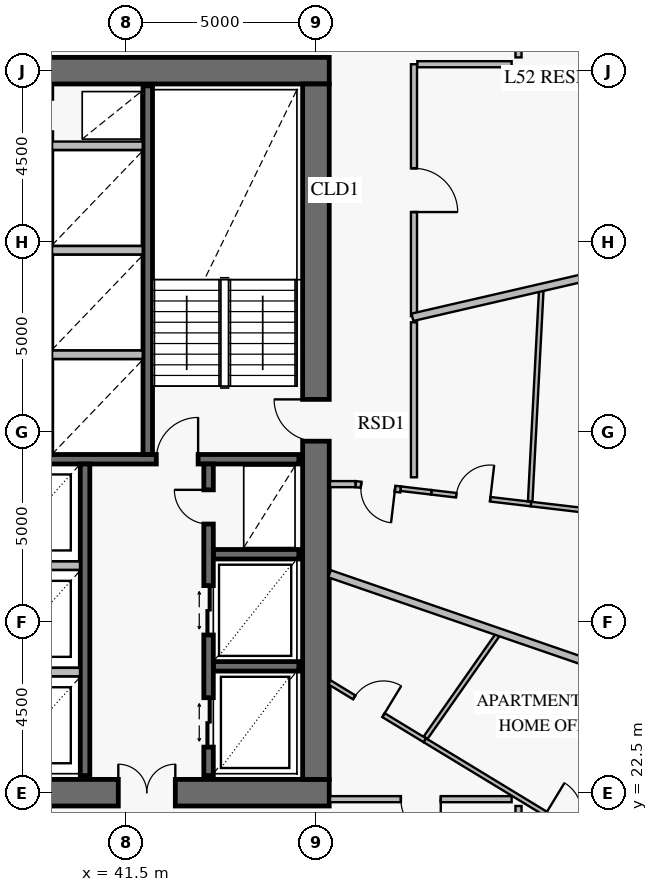
"""IFC4 building model, lengths in metres.
Left out: names, types, materials, properties, quantities, classifications, styles, units other than length and angle.
Written with IfcOpenShell. Run it as: python <this file> out.ifc"""

import sys

from ifc_helpers import new_model, si_unit, direction, frame, frame_2d, origin, place, context, subcontext, project, spatial, rectangle, extrude, element, fill, save


model = new_model("IFC4")
c1 = context("Model", 3, precision=1e-05, world=origin(), true_north=direction((0.0, 1.0)))
c2 = subcontext(c1, "Body", "Model", "MODEL_VIEW")
j1 = project(units=[si_unit("LENGTHUNIT", "METRE"), si_unit("PLANEANGLEUNIT", "RADIAN")], contexts=[c1])
p1 = place(None, origin())
s1 = spatial("IfcSite", under=j1, at=p1, CompositionType="ELEMENT")
p2 = place(p1, origin())
s2 = spatial("IfcBuilding", under=s1, at=p2, CompositionType="ELEMENT")
p3 = place(p2, frame((0.0, 0.0, 207.4)))
s3 = spatial("IfcBuildingStorey", under=s2, at=p3, CompositionType="ELEMENT", Elevation=207.4)
p4 = place(p3, frame((37.35, 22.5, 0.0), z_axis=(0.0, 0.0, 1.0), x_axis=(1.0, 0.0, 0.0)))
e1 = element("IfcWall", 1, at=p4, inside=s3, PredefinedType="SHEAR", context=c2, shape_type="SweptSolid", body=[
    extrude(rectangle(XDim=9.5, YDim=0.7, at=frame_2d((4.75, 0.0))), origin(), (0.0, 0.0, 1.0), 3.8),
])
p5 = place(p4, frame((3.95, 0.0, 0.0)))
e2 = element("IfcOpeningElement", 2, at=p5, cuts=e1, PredefinedType="OPENING", context=c2, shape_type="SweptSolid", body=[
    extrude(rectangle(XDim=1.5, YDim=2.15, at=frame_2d((0.75, 1.075))), frame((0.0, 0.362, 0.0), z_axis=(0.0, -1.0, 0.0), x_axis=(1.0, 0.0, 0.0)), (0.0, 0.0, 1.0), 0.724),
])
p6 = place(p3, frame((46.85, 41.5, 0.0), z_axis=(0.0, 0.0, 1.0), x_axis=(-1.0, 0.0, 0.0)))
e3 = element("IfcWall", 3, at=p6, inside=s3, PredefinedType="SHEAR", context=c2, shape_type="SweptSolid", body=[
    extrude(rectangle(XDim=7.9, YDim=0.7, at=frame_2d((3.95, 0.0))), origin(), (0.0, 0.0, 1.0), 3.8),
])
p7 = place(p3, frame((46.5, 22.85, 0.0), z_axis=(0.0, 0.0, 1.0), x_axis=(0.0, 1.0, 0.0)))
e4 = element("IfcWall", 4, at=p7, inside=s3, PredefinedType="SHEAR", context=c2, shape_type="SweptSolid", body=[
    extrude(rectangle(XDim=18.3, YDim=0.7, at=frame_2d((9.15, 0.0))), origin(), (0.0, 0.0, 1.0), 3.8),
])
p8 = place(p7, frame((8.9, 0.0, 0.0)))
e5 = element("IfcOpeningElement", 5, at=p8, cuts=e4, PredefinedType="OPENING", context=c2, shape_type="SweptSolid", body=[
    extrude(rectangle(XDim=1.1, YDim=2.15, at=frame_2d((0.55, 1.075))), frame((0.0, 0.362, 0.0), z_axis=(0.0, -1.0, 0.0), x_axis=(1.0, 0.0, 0.0)), (0.0, 0.0, 1.0), 0.724),
])
p9 = place(p3, frame((25.95, 31.275, 0.0), z_axis=(0.0, 0.0, 1.0), x_axis=(1.0, 0.0, 0.0)))
e6 = element("IfcWall", 6, at=p9, inside=s3, PredefinedType="SOLIDWALL", context=c2, shape_type="SweptSolid", body=[
    extrude(rectangle(XDim=20.1, YDim=0.25, at=frame_2d((10.05, 0.0))), origin(), (0.0, 0.0, 1.0), 3.8),
])
p10 = place(p9, frame((2.6, 0.0, 0.0)))
e7 = element("IfcOpeningElement", 7, at=p10, cuts=e6, PredefinedType="OPENING", context=c2, shape_type="SweptSolid", body=[
    extrude(rectangle(XDim=1.1, YDim=2.15, at=frame_2d((0.55, 1.075))), frame((0.0, 0.137, 0.0), z_axis=(0.0, -1.0, 0.0), x_axis=(1.0, 0.0, 0.0)), (0.0, 0.0, 1.0), 0.274),
])
p11 = place(p9, frame((10.6, 0.0, 0.0)))
e8 = element("IfcOpeningElement", 8, at=p11, cuts=e6, PredefinedType="OPENING", context=c2, shape_type="SweptSolid", body=[
    extrude(rectangle(XDim=1.1, YDim=2.15, at=frame_2d((0.55, 1.075))), frame((0.0, 0.137, 0.0), z_axis=(0.0, -1.0, 0.0), x_axis=(1.0, 0.0, 0.0)), (0.0, 0.0, 1.0), 0.274),
])
p12 = place(p9, frame((16.35, 0.0, 0.0)))
e9 = element("IfcOpeningElement", 9, at=p12, cuts=e6, PredefinedType="OPENING", context=c2, shape_type="SweptSolid", body=[
    extrude(rectangle(XDim=1.1, YDim=2.15, at=frame_2d((0.55, 1.075))), frame((0.0, 0.137, 0.0), z_axis=(0.0, -1.0, 0.0), x_axis=(1.0, 0.0, 0.0)), (0.0, 0.0, 1.0), 0.274),
])
p13 = place(p3, frame((42.075, 31.4, 0.0), z_axis=(0.0, 0.0, 1.0), x_axis=(0.0, 1.0, 0.0)))
e10 = element("IfcWall", 10, at=p13, inside=s3, PredefinedType="SOLIDWALL", context=c2, shape_type="SweptSolid", body=[
    extrude(rectangle(XDim=9.7, YDim=0.25, at=frame_2d((4.85, 0.0))), origin(), (0.0, 0.0, 1.0), 3.8),
])
p14 = place(p3, frame((40.425, 22.95, 0.0), z_axis=(0.0, 0.0, 1.0), x_axis=(0.0, 1.0, 0.0)))
e11 = element("IfcWall", 11, at=p14, inside=s3, PredefinedType="SOLIDWALL", context=c2, shape_type="SweptSolid", body=[
    extrude(rectangle(XDim=8.2, YDim=0.25, at=frame_2d((4.1, 0.0))), origin(), (0.0, 0.0, 1.0), 3.8),
])
for number, where, z_axis, x_axis in (
    (12, (43.8, 25.825, 0.0), (0.0, 0.0, 1.0), (1.0, 0.0, 0.0)),
    (13, (43.8, 28.775, 0.0), (0.0, 0.0, 1.0), (1.0, 0.0, 0.0)),
):
    element("IfcWall", number, at=place(p3, frame(where, z_axis=z_axis, x_axis=x_axis)), inside=s3, PredefinedType="SOLIDWALL", context=c2, shape_type="SweptSolid", body=[
        extrude(rectangle(XDim=2.25, YDim=0.25, at=frame_2d((1.125, 0.0))), origin(), (0.0, 0.0, 1.0), 3.8),
    ])
p15 = place(p3, frame((43.675, 22.95, 0.0), z_axis=(0.0, 0.0, 1.0), x_axis=(0.0, 1.0, 0.0)))
e14 = element("IfcWall", 14, at=p15, inside=s3, PredefinedType="SOLIDWALL", context=c2, shape_type="SweptSolid", body=[
    extrude(rectangle(XDim=8.2, YDim=0.25, at=frame_2d((4.1, 0.0))), origin(), (0.0, 0.0, 1.0), 3.8),
])
p16 = place(p15, frame((0.75, 0.0, 0.0)))
e15 = element("IfcOpeningElement", 15, at=p16, cuts=e14, PredefinedType="OPENING", context=c2, shape_type="SweptSolid", body=[
    extrude(rectangle(XDim=1.3, YDim=2.3, at=frame_2d((0.65, 1.15))), frame((0.0, 0.137, 0.0), z_axis=(0.0, -1.0, 0.0), x_axis=(1.0, 0.0, 0.0)), (0.0, 0.0, 1.0), 0.274),
])
p17 = place(p15, frame((3.7, 0.0, 0.0)))
e16 = element("IfcOpeningElement", 16, at=p17, cuts=e14, PredefinedType="OPENING", context=c2, shape_type="SweptSolid", body=[
    extrude(rectangle(XDim=1.3, YDim=2.3, at=frame_2d((0.65, 1.15))), frame((0.0, 0.137, 0.0), z_axis=(0.0, -1.0, 0.0), x_axis=(1.0, 0.0, 0.0)), (0.0, 0.0, 1.0), 0.274),
])
p18 = place(p15, frame((6.62, 0.0, 0.0)))
e17 = element("IfcOpeningElement", 17, at=p18, cuts=e14, PredefinedType="OPENING", context=c2, shape_type="SweptSolid", body=[
    extrude(rectangle(XDim=0.9, YDim=2.1, at=frame_2d((0.45, 1.05))), frame((0.0, 0.137, 0.0), z_axis=(0.0, -1.0, 0.0), x_axis=(1.0, 0.0, 0.0)), (0.0, 0.0, 1.0), 0.274),
])
p19 = place(p3, frame((46.858, 25.404, 0.0), z_axis=(0.0, 0.0, 1.0), x_axis=(0.85464129029, -0.519218898857, 0.0)))
e18 = element("IfcWall", 18, at=p19, inside=s3, PredefinedType="PARTITIONING", context=c2, shape_type="SweptSolid", body=[
    extrude(rectangle(XDim=2.937, YDim=0.12, at=frame_2d((1.469, 0.0))), origin(), (0.0, 0.0, 1.0), 3.55),
])
p20 = place(p19, frame((0.761, 0.0, 0.0)))
e19 = element("IfcOpeningElement", 19, at=p20, cuts=e18, PredefinedType="OPENING", context=c2, shape_type="SweptSolid", body=[
    extrude(rectangle(XDim=0.9, YDim=2.1, at=frame_2d((0.45, 1.05))), frame((0.0, 0.072, 0.0), z_axis=(0.0, -1.0, 0.0), x_axis=(1.0, 0.0, 0.0)), (0.0, 0.0, 1.0), 0.144),
])
p21 = place(p3, frame((49.368, 23.879, 0.0), z_axis=(0.0, 0.0, 1.0), x_axis=(0.854630517303, -0.519236630925, 0.0)))
e20 = element("IfcWall", 20, at=p21, inside=s3, PredefinedType="PARTITIONING", context=c2, shape_type="SweptSolid", body=[
    extrude(rectangle(XDim=7.122, YDim=0.12, at=frame_2d((3.561, 0.0))), origin(), (0.0, 0.0, 1.0), 3.15),
])
p22 = place(p21, frame((3.721, 0.0, 0.0)))
e21 = element("IfcOpeningElement", 21, at=p22, cuts=e20, PredefinedType="OPENING", context=c2, shape_type="SweptSolid", body=[
    extrude(rectangle(XDim=0.95, YDim=2.1, at=frame_2d((0.475, 1.05))), frame((0.0, 0.072, 0.0), z_axis=(0.0, -1.0, 0.0), x_axis=(1.0, 0.0, 0.0)), (0.0, 0.0, 1.0), 0.144),
])
p23 = place(p3, frame((51.65, 22.33, 0.0), z_axis=(0.0, 0.0, 1.0), x_axis=(-1.0, 0.0, 0.0)))
e22 = element("IfcWall", 22, at=p23, inside=s3, PredefinedType="PARTITIONING", context=c2, shape_type="SweptSolid", body=[
    extrude(rectangle(XDim=4.78, YDim=0.16, at=frame_2d((2.39, 0.0))), origin(), (0.0, 0.0, 1.0), 3.55),
])
p24 = place(p23, frame((1.865, 0.0, 0.0)))
e23 = element("IfcOpeningElement", 23, at=p24, cuts=e22, PredefinedType="OPENING", context=c2, shape_type="SweptSolid", body=[
    extrude(rectangle(XDim=1.05, YDim=2.15, at=frame_2d((0.525, 1.075))), frame((0.0, 0.092, 0.0), z_axis=(0.0, -1.0, 0.0), x_axis=(1.0, 0.0, 0.0)), (0.0, 0.0, 1.0), 0.184),
])
p25 = place(p3, frame((49.537, 30.405, 0.0), z_axis=(0.0, 0.0, 1.0), x_axis=(0.993127868893, -0.117034336965, 0.0)))
e24 = element("IfcWall", 24, at=p25, inside=s3, PredefinedType="PARTITIONING", context=c2, shape_type="SweptSolid", body=[
    extrude(rectangle(XDim=2.641, YDim=0.12, at=frame_2d((1.32, 0.0))), origin(), (0.0, 0.0, 1.0), 3.55),
])
p26 = place(p25, frame((0.659, 0.0, 0.0)))
e25 = element("IfcOpeningElement", 25, at=p26, cuts=e24, PredefinedType="OPENING", context=c2, shape_type="SweptSolid", body=[
    extrude(rectangle(XDim=0.9, YDim=2.1, at=frame_2d((0.45, 1.05))), frame((0.0, 0.072, 0.0), z_axis=(0.0, -1.0, 0.0), x_axis=(1.0, 0.0, 0.0)), (0.0, 0.0, 1.0), 0.144),
])
p27 = place(p3, frame((52.159, 30.096, 0.0), z_axis=(0.0, 0.0, 1.0), x_axis=(0.993128962812, -0.117025053828, 0.0)))
e26 = element("IfcWall", 26, at=p27, inside=s3, PredefinedType="PARTITIONING", context=c2, shape_type="SweptSolid", body=[
    extrude(rectangle(XDim=10.25, YDim=0.12, at=frame_2d((5.125, 0.0))), origin(), (0.0, 0.0, 1.0), 2.87),
])
p28 = place(p27, frame((4.625, 0.0, 0.0)))
e27 = element("IfcOpeningElement", 27, at=p28, cuts=e26, PredefinedType="OPENING", context=c2, shape_type="SweptSolid", body=[
    extrude(rectangle(XDim=0.95, YDim=2.1, at=frame_2d((0.475, 1.05))), frame((0.0, 0.072, 0.0), z_axis=(0.0, -1.0, 0.0), x_axis=(1.0, 0.0, 0.0)), (0.0, 0.0, 1.0), 0.144),
])
p29 = place(p3, frame((47.541, 30.62, 0.0), z_axis=(0.0, 0.0, 1.0), x_axis=(0.993117135496, -0.117125382325, 0.0)))
e28 = element("IfcWall", 28, at=p29, inside=s3, PredefinedType="PARTITIONING", context=c2, shape_type="SweptSolid", body=[
    extrude(rectangle(XDim=1.197, YDim=0.16, at=frame_2d((0.598, 0.0))), origin(), (0.0, 0.0, 1.0), 3.55),
])
p30 = place(p29, frame((0.148, 0.0, 0.0)))
e29 = element("IfcOpeningElement", 29, at=p30, cuts=e28, PredefinedType="OPENING", context=c2, shape_type="SweptSolid", body=[
    extrude(rectangle(XDim=0.9, YDim=2.1, at=frame_2d((0.45, 1.05))), frame((0.0, 0.092, 0.0), z_axis=(0.0, -1.0, 0.0), x_axis=(1.0, 0.0, 0.0)), (0.0, 0.0, 1.0), 0.184),
])
p31 = place(p3, frame((49.08, 35.04, 0.0), z_axis=(0.0, 0.0, 1.0), x_axis=(0.0, 1.0, 0.0)))
e30 = element("IfcWall", 30, at=p31, inside=s3, PredefinedType="PARTITIONING", context=c2, shape_type="SweptSolid", body=[
    extrude(rectangle(XDim=6.63, YDim=0.16, at=frame_2d((3.315, 0.0))), origin(), (0.0, 0.0, 1.0), 2.9),
])
p32 = place(p31, frame((2.74, 0.0, 0.0)))
e31 = element("IfcOpeningElement", 31, at=p32, cuts=e30, PredefinedType="OPENING", context=c2, shape_type="SweptSolid", body=[
    extrude(rectangle(XDim=1.15, YDim=2.2, at=frame_2d((0.575, 1.1))), frame((0.0, 0.092, 0.0), z_axis=(0.0, -1.0, 0.0), x_axis=(1.0, 0.0, 0.0)), (0.0, 0.0, 1.0), 0.184),
])
for number, where, z_axis, x_axis in (
    (32, (39.558, 34.025, 0.0), (0.0, 0.0, 1.0), (1.0, 0.0, 0.0)),
    (33, (39.558, 36.775, 0.0), (0.0, 0.0, 1.0), (1.0, 0.0, 0.0)),
    (34, (39.558, 39.525, 0.0), (0.0, 0.0, 1.0), (1.0, 0.0, 0.0)),
):
    element("IfcWall", number, at=place(p3, frame(where, z_axis=z_axis, x_axis=x_axis)), inside=s3, PredefinedType="PARTITIONING", context=c2, shape_type="SweptSolid", body=[
        extrude(rectangle(XDim=2.384, YDim=0.22, at=frame_2d((1.192, 0.0))), origin(), (0.0, 0.0, 1.0), 3.55),
    ])
for number, where, z_axis, x_axis in (
    (35, (38.008, 25.675, 0.0), (0.0, 0.0, 1.0), (1.0, 0.0, 0.0)),
    (36, (38.008, 28.475, 0.0), (0.0, 0.0, 1.0), (1.0, 0.0, 0.0)),
):
    element("IfcWall", number, at=place(p3, frame(where, z_axis=z_axis, x_axis=x_axis)), inside=s3, PredefinedType="PARTITIONING", context=c2, shape_type="SweptSolid", body=[
        extrude(rectangle(XDim=2.284, YDim=0.22, at=frame_2d((1.142, 0.0))), origin(), (0.0, 0.0, 1.0), 3.55),
    ])
p33 = place(p3, frame((49.385, 23.948, 0.0), z_axis=(0.0, 0.0, 1.0), x_axis=(0.573609327382, 0.819129012757, 0.0)))
e37 = element("IfcWall", 37, at=p33, inside=s3, PredefinedType="PARTITIONING", context=c2, shape_type="SweptSolid", body=[
    extrude(rectangle(XDim=3.344, YDim=0.12, at=frame_2d((1.672, 0.0))), origin(), (0.0, 0.0, 1.0), 3.55),
])
p34 = place(p3, frame((46.858, 28.261, 0.0), z_axis=(0.0, 0.0, 1.0), x_axis=(0.945519192018, -0.325566364243, 0.0)))
e38 = element("IfcWall", 38, at=p34, inside=s3, PredefinedType="PARTITIONING", context=c2, shape_type="SweptSolid", body=[
    extrude(rectangle(XDim=16.208, YDim=0.2, at=frame_2d((8.104, 0.0))), origin(), (0.0, 0.0, 1.0), 2.87),
])
p35 = place(p3, frame((48.732, 30.5, 0.0), z_axis=(0.0, 0.0, 1.0), x_axis=(0.993146491389, -0.116876202202, 0.0)))
e39 = element("IfcWall", 39, at=p35, inside=s3, PredefinedType="PARTITIONING", context=c2, shape_type="SweptSolid", body=[
    extrude(rectangle(XDim=0.811, YDim=0.12, at=frame_2d((0.405, 0.0))), origin(), (0.0, 0.0, 1.0), 3.55),
])
p36 = place(p3, frame((52.138, 30.167, 0.0), z_axis=(0.0, 0.0, 1.0), x_axis=(0.052317957022, 0.998630477891, 0.0)))
e40 = element("IfcWall", 40, at=p36, inside=s3, PredefinedType="PARTITIONING", context=c2, shape_type="SweptSolid", body=[
    extrude(rectangle(XDim=5.586, YDim=0.12, at=frame_2d((2.793, 0.0))), origin(), (0.0, 0.0, 1.0), 3.55),
])
p37 = place(p3, frame((49.04, 35.01, 0.0), z_axis=(0.0, 0.0, 1.0), x_axis=(0.974369033518, 0.224955521206, 0.0)))
e41 = element("IfcWall", 41, at=p37, inside=s3, PredefinedType="PARTITIONING", context=c2, shape_type="SweptSolid", body=[
    extrude(rectangle(XDim=15.042, YDim=0.2, at=frame_2d((7.521, 0.0))), origin(), (0.0, 0.0, 1.0), 2.87),
])
p38 = place(p3, frame((51.83, 18.45, 0.0), z_axis=(0.0, 0.0, 1.0), x_axis=(0.0, 1.0, 0.0)))
e42 = element("IfcWall", 42, at=p38, inside=s3, PredefinedType="PARTITIONING", context=c2, shape_type="SweptSolid", body=[
    extrude(rectangle(XDim=3.7, YDim=0.16, at=frame_2d((1.85, 0.0))), origin(), (0.0, 0.0, 1.0), 3.15),
])
p39 = place(p3, frame((46.87, 30.62, 0.0), z_axis=(0.0, 0.0, 1.0), x_axis=(1.0, 0.0, 0.0)))
e43 = element("IfcWall", 43, at=p39, inside=s3, PredefinedType="PARTITIONING", context=c2, shape_type="SweptSolid", body=[
    extrude(rectangle(XDim=0.671, YDim=0.16, at=frame_2d((0.335, 0.0))), origin(), (0.0, 0.0, 1.0), 3.55),
])
p40 = place(p3, frame((49.08, 30.8, 0.0), z_axis=(0.0, 0.0, 1.0), x_axis=(0.0, 1.0, 0.0)))
e44 = element("IfcWall", 44, at=p40, inside=s3, PredefinedType="PARTITIONING", context=c2, shape_type="SweptSolid", body=[
    extrude(rectangle(XDim=4.079, YDim=0.16, at=frame_2d((2.04, 0.0))), origin(), (0.0, 0.0, 1.0), 3.55),
])
p41 = place(p3, frame((51.83, 41.85, 0.0), z_axis=(0.0, 0.0, 1.0), x_axis=(0.0, 1.0, 0.0)))
e45 = element("IfcWall", 45, at=p41, inside=s3, PredefinedType="PARTITIONING", context=c2, shape_type="SweptSolid", body=[
    extrude(rectangle(XDim=3.7, YDim=0.16, at=frame_2d((1.85, 0.0))), origin(), (0.0, 0.0, 1.0), 3.15),
])
p42 = place(p3, frame((49.168, 41.67, 0.0), z_axis=(0.0, 0.0, 1.0), x_axis=(1.0, 0.0, 0.0)))
e46 = element("IfcWall", 46, at=p42, inside=s3, PredefinedType="PARTITIONING", context=c2, shape_type="SweptSolid", body=[
    extrude(rectangle(XDim=2.482, YDim=0.16, at=frame_2d((1.241, 0.0))), origin(), (0.0, 0.0, 1.0), 3.55),
])
p43 = place(p8, origin())
e47 = element("IfcDoor", 47, at=p43, inside=s3, OperationType="SINGLE_SWING_RIGHT", PredefinedType="USERDEFINED", context=c2, shape_type="SweptSolid", body=[
    extrude(rectangle(XDim=1.1, YDim=2.15, at=frame_2d((0.55, 1.075))), frame((0.0, 0.025, 0.0), z_axis=(0.0, -1.0, 0.0), x_axis=(1.0, 0.0, 0.0)), (0.0, 0.0, 1.0), 0.05),
])
fill(e5, e47)
p44 = place(p5, origin())
e48 = element("IfcDoor", 48, at=p44, inside=s3, OperationType="DOUBLE_DOOR_SINGLE_SWING", PredefinedType="DOOR", context=c2, shape_type="SweptSolid", body=[
    extrude(rectangle(XDim=1.5, YDim=2.15, at=frame_2d((0.75, 1.075))), frame((0.0, 0.025, 0.0), z_axis=(0.0, -1.0, 0.0), x_axis=(1.0, 0.0, 0.0)), (0.0, 0.0, 1.0), 0.05),
])
fill(e2, e48)
p45 = place(p12, origin())
e49 = element("IfcDoor", 49, at=p45, inside=s3, OperationType="SINGLE_SWING_RIGHT", PredefinedType="USERDEFINED", context=c2, shape_type="SweptSolid", body=[
    extrude(rectangle(XDim=1.1, YDim=2.15, at=frame_2d((0.55, 1.075))), frame((0.0, 0.025, 0.0), z_axis=(0.0, -1.0, 0.0), x_axis=(1.0, 0.0, 0.0)), (0.0, 0.0, 1.0), 0.05),
])
fill(e9, e49)
p46 = place(p16, origin())
e50 = element("IfcDoor", 50, at=p46, inside=s3, OperationType="DOUBLE_DOOR_SLIDING", PredefinedType="DOOR", context=c2, shape_type="SweptSolid", body=[
    extrude(rectangle(XDim=1.3, YDim=2.3, at=frame_2d((0.65, 1.15))), frame((0.0, 0.025, 0.0), z_axis=(0.0, -1.0, 0.0), x_axis=(1.0, 0.0, 0.0)), (0.0, 0.0, 1.0), 0.05),
])
fill(e15, e50)
p47 = place(p17, origin())
e51 = element("IfcDoor", 51, at=p47, inside=s3, OperationType="DOUBLE_DOOR_SLIDING", PredefinedType="DOOR", context=c2, shape_type="SweptSolid", body=[
    extrude(rectangle(XDim=1.3, YDim=2.3, at=frame_2d((0.65, 1.15))), frame((0.0, 0.025, 0.0), z_axis=(0.0, -1.0, 0.0), x_axis=(1.0, 0.0, 0.0)), (0.0, 0.0, 1.0), 0.05),
])
fill(e16, e51)
p48 = place(p18, origin())
e52 = element("IfcDoor", 52, at=p48, inside=s3, OperationType="SINGLE_SWING_RIGHT", PredefinedType="DOOR", context=c2, shape_type="SweptSolid", body=[
    extrude(rectangle(XDim=0.9, YDim=2.1, at=frame_2d((0.45, 1.05))), frame((0.0, 0.025, 0.0), z_axis=(0.0, -1.0, 0.0), x_axis=(1.0, 0.0, 0.0)), (0.0, 0.0, 1.0), 0.05),
])
fill(e17, e52)
p49 = place(p20, origin())
e53 = element("IfcDoor", 53, at=p49, inside=s3, OperationType="SINGLE_SWING_RIGHT", PredefinedType="DOOR", context=c2, shape_type="SweptSolid", body=[
    extrude(rectangle(XDim=0.9, YDim=2.1, at=frame_2d((0.45, 1.05))), frame((0.0, 0.025, 0.0), z_axis=(0.0, -1.0, 0.0), x_axis=(1.0, 0.0, 0.0)), (0.0, 0.0, 1.0), 0.05),
])
fill(e19, e53)
p50 = place(p24, origin())
e54 = element("IfcDoor", 54, at=p50, inside=s3, OperationType="SINGLE_SWING_LEFT", PredefinedType="DOOR", context=c2, shape_type="SweptSolid", body=[
    extrude(rectangle(XDim=1.05, YDim=2.15, at=frame_2d((0.525, 1.075))), frame((0.0, 0.025, 0.0), z_axis=(0.0, -1.0, 0.0), x_axis=(1.0, 0.0, 0.0)), (0.0, 0.0, 1.0), 0.05),
])
fill(e23, e54)
p51 = place(p26, origin())
e55 = element("IfcDoor", 55, at=p51, inside=s3, OperationType="SINGLE_SWING_RIGHT", PredefinedType="DOOR", context=c2, shape_type="SweptSolid", body=[
    extrude(rectangle(XDim=0.9, YDim=2.1, at=frame_2d((0.45, 1.05))), frame((0.0, 0.025, 0.0), z_axis=(0.0, -1.0, 0.0), x_axis=(1.0, 0.0, 0.0)), (0.0, 0.0, 1.0), 0.05),
])
fill(e25, e55)
p52 = place(p30, frame((0.9, 0.0, 0.0), z_axis=(0.0, 0.0, 1.0), x_axis=(-1.0, 0.0, 0.0)))
e56 = element("IfcDoor", 56, at=p52, inside=s3, OperationType="SINGLE_SWING_LEFT", PredefinedType="DOOR", context=c2, shape_type="SweptSolid", body=[
    extrude(rectangle(XDim=0.9, YDim=2.1, at=frame_2d((0.45, 1.05))), frame((0.0, 0.025, 0.0), z_axis=(0.0, -1.0, 0.0), x_axis=(1.0, 0.0, 0.0)), (0.0, 0.0, 1.0), 0.05),
])
fill(e29, e56)
p53 = place(p32, frame((1.15, 0.0, 0.0), z_axis=(0.0, 0.0, 1.0), x_axis=(-1.0, 0.0, 0.0)))
e57 = element("IfcDoor", 57, at=p53, inside=s3, OperationType="SINGLE_SWING_RIGHT", PredefinedType="DOOR", context=c2, shape_type="SweptSolid", body=[
    extrude(rectangle(XDim=1.15, YDim=2.2, at=frame_2d((0.575, 1.1))), frame((0.0, 0.025, 0.0), z_axis=(0.0, -1.0, 0.0), x_axis=(1.0, 0.0, 0.0)), (0.0, 0.0, 1.0), 0.05),
])
fill(e31, e57)
save(model, sys.argv[1])
